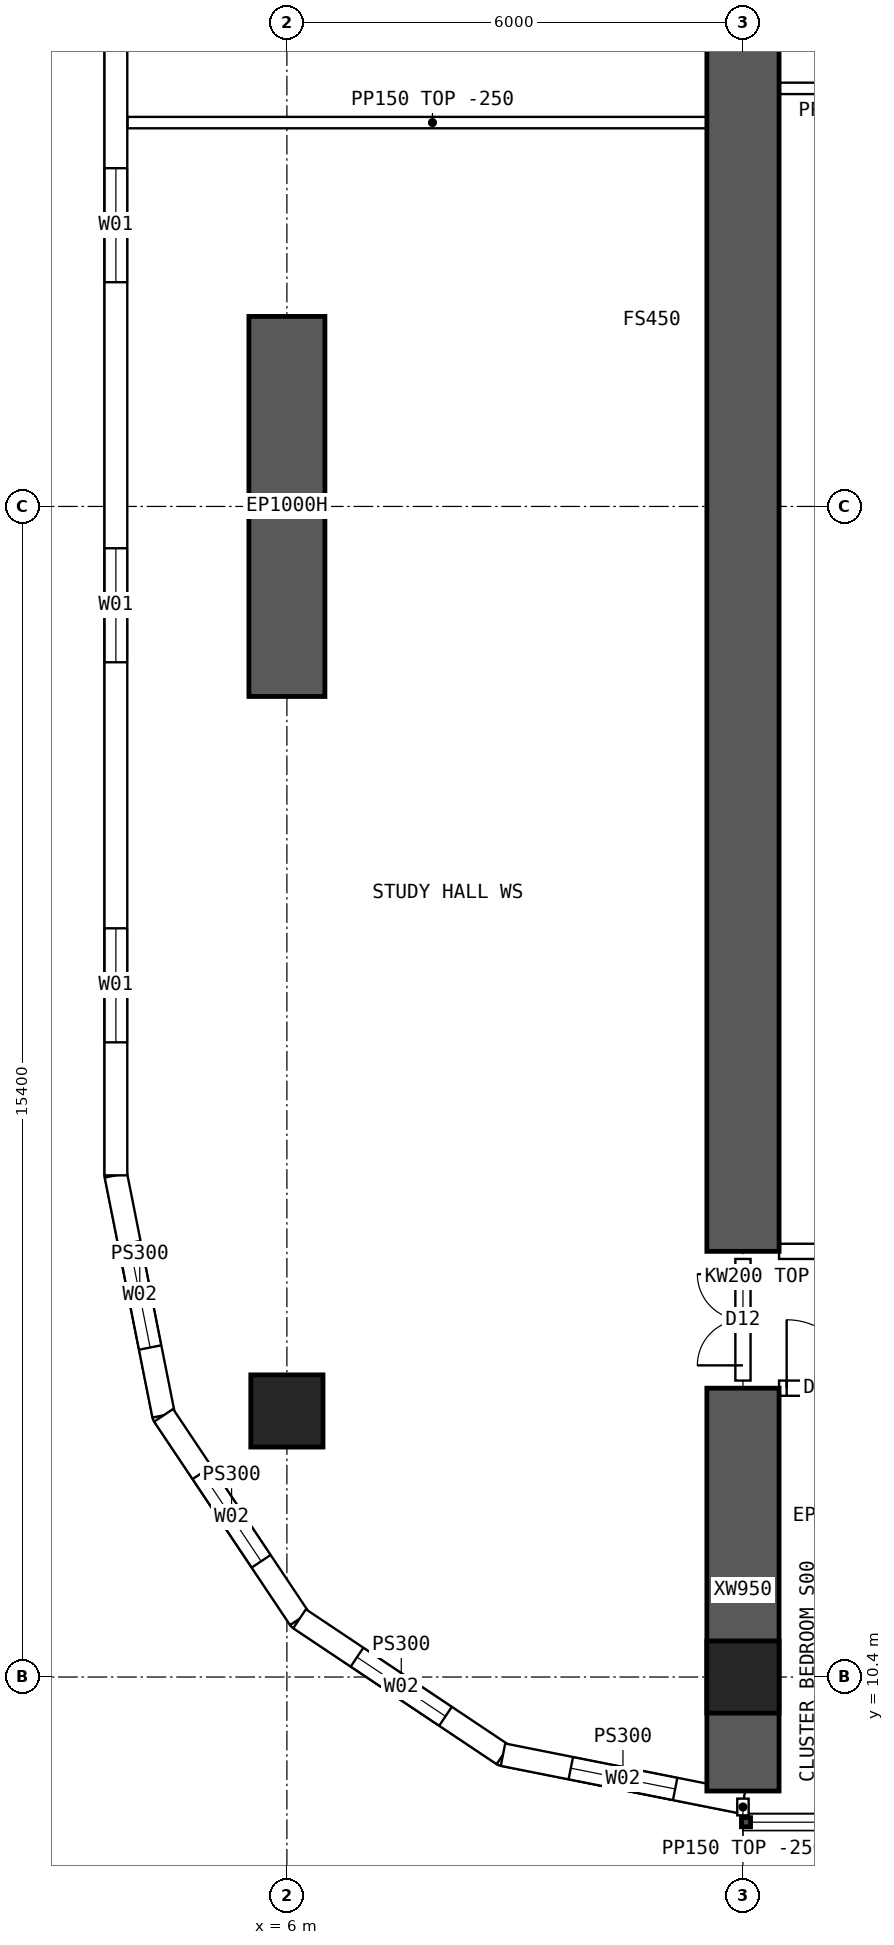
"""IFC4 building model, lengths in metres.
Left out: names, types, materials, properties, quantities, classifications, styles, units other than length and angle.
Written with IfcOpenShell. Run it as: python <this file> out.ifc"""

import sys

from ifc_helpers import new_model, si_unit, direction, frame, frame_2d, origin, origin_2d, place, context, subcontext, project, spatial, polyline, rectangle, hollow_rectangle, outline, extrude, element, fill, save


model = new_model("IFC4")
c1 = context("Model", 3, precision=1e-05, world=origin(), true_north=direction((0.0, 1.0)))
c2 = subcontext(c1, "Body", "Model", "MODEL_VIEW")
j1 = project(units=[si_unit("LENGTHUNIT", "METRE"), si_unit("PLANEANGLEUNIT", "RADIAN")], contexts=[c1])
p1 = place(None, origin())
s1 = spatial("IfcSite", under=j1, at=p1, CompositionType="ELEMENT")
p2 = place(p1, origin())
s2 = spatial("IfcBuilding", under=s1, at=p2, CompositionType="ELEMENT")
p3 = place(p2, frame((0.0, 0.0, 114.4)))
s3 = spatial("IfcBuildingStorey", under=s2, at=p3, CompositionType="ELEMENT", Elevation=114.4)
for number, where, z_axis, x_axis in (
    (1, (12.0, 10.4, 0.0), (0.0, 0.0, 1.0), (1.0, 0.0, 0.0)),
    (2, (6.0, 13.9, 0.0), (0.0, 0.0, 1.0), (1.0, 0.0, 0.0)),
):
    element("IfcColumn", number, at=place(p3, frame(where, z_axis=z_axis, x_axis=x_axis)), inside=s3, PredefinedType="COLUMN", context=c2, shape_type="SweptSolid", body=[
        extrude(hollow_rectangle(XDim=0.95, YDim=0.95, WallThickness=0.095, at=origin_2d()), origin(), (0.0, 0.0, 1.0), 3.75),
    ])
p4 = place(p3, frame((6.0, 23.3, 0.0), z_axis=(0.0, 0.0, 1.0), x_axis=(0.0, 1.0, 0.0)))
e3 = element("IfcWall", 3, at=p4, inside=s3, PredefinedType="SHEAR", context=c2, shape_type="SweptSolid", body=[
    extrude(rectangle(XDim=5.0, YDim=1.0, at=frame_2d((2.5, 0.0))), origin(), (0.0, 0.0, 1.0), 3.75),
])
p5 = place(p3, frame((12.0, 8.9, 0.0), z_axis=(0.0, 0.0, 1.0), x_axis=(0.0, 1.0, 0.0)))
e4 = element("IfcWall", 4, at=p5, inside=s3, PredefinedType="SHEAR", context=c2, shape_type="SweptSolid", body=[
    extrude(rectangle(XDim=5.3, YDim=0.95, at=frame_2d((2.65, 0.0))), origin(), (0.0, 0.0, 1.0), 3.75),
])
p6 = place(p3, frame((12.0, 16.0, 0.0), z_axis=(0.0, 0.0, 1.0), x_axis=(0.0, 1.0, 0.0)))
e5 = element("IfcWall", 5, at=p6, inside=s3, PredefinedType="SHEAR", context=c2, shape_type="SweptSolid", body=[
    extrude(rectangle(XDim=32.0, YDim=0.95, at=frame_2d((16.0, 0.0))), origin(), (0.0, 0.0, 1.0), 3.75),
])
p7 = place(p3, frame((3.75, 47.0, 0.0), z_axis=(0.0, 0.0, 1.0), x_axis=(0.0, -1.0, 0.0)))
e6 = element("IfcWall", 6, at=p7, inside=s3, PredefinedType="SOLIDWALL", context=c2, shape_type="SweptSolid", body=[
    extrude(outline(polyline([(-0.015, -0.15), (30.015, -0.15), (29.985, 0.15), (0.015, 0.15), (-0.015, -0.15)])), origin(), (0.0, 0.0, 1.0), 3.5),
])
p8 = place(p7, frame((1.75, 0.0, 0.9)))
e7 = element("IfcOpeningElement", 7, at=p8, cuts=e6, PredefinedType="OPENING", context=c2, shape_type="SweptSolid", body=[
    extrude(rectangle(XDim=1.5, YDim=2.0, at=frame_2d((0.75, 1.0))), frame((0.0, 0.16, 0.0), z_axis=(0.0, -1.0, 0.0), x_axis=(1.0, 0.0, 0.0)), (0.0, 0.0, 1.0), 0.32),
])
p9 = place(p7, frame((6.75, 0.0, 0.9)))
e8 = element("IfcOpeningElement", 8, at=p9, cuts=e6, PredefinedType="OPENING", context=c2, shape_type="SweptSolid", body=[
    extrude(rectangle(XDim=1.5, YDim=2.0, at=frame_2d((0.75, 1.0))), frame((0.0, 0.16, 0.0), z_axis=(0.0, -1.0, 0.0), x_axis=(1.0, 0.0, 0.0)), (0.0, 0.0, 1.0), 0.32),
])
p10 = place(p7, frame((11.75, 0.0, 0.9)))
e9 = element("IfcOpeningElement", 9, at=p10, cuts=e6, PredefinedType="OPENING", context=c2, shape_type="SweptSolid", body=[
    extrude(rectangle(XDim=1.5, YDim=2.0, at=frame_2d((0.75, 1.0))), frame((0.0, 0.16, 0.0), z_axis=(0.0, -1.0, 0.0), x_axis=(1.0, 0.0, 0.0)), (0.0, 0.0, 1.0), 0.32),
])
p11 = place(p7, frame((16.75, 0.0, 0.9)))
e10 = element("IfcOpeningElement", 10, at=p11, cuts=e6, PredefinedType="OPENING", context=c2, shape_type="SweptSolid", body=[
    extrude(rectangle(XDim=1.5, YDim=2.0, at=frame_2d((0.75, 1.0))), frame((0.0, 0.16, 0.0), z_axis=(0.0, -1.0, 0.0), x_axis=(1.0, 0.0, 0.0)), (0.0, 0.0, 1.0), 0.32),
])
p12 = place(p7, frame((21.75, 0.0, 0.9)))
e11 = element("IfcOpeningElement", 11, at=p12, cuts=e6, PredefinedType="OPENING", context=c2, shape_type="SweptSolid", body=[
    extrude(rectangle(XDim=1.5, YDim=2.0, at=frame_2d((0.75, 1.0))), frame((0.0, 0.16, 0.0), z_axis=(0.0, -1.0, 0.0), x_axis=(1.0, 0.0, 0.0)), (0.0, 0.0, 1.0), 0.32),
])
p13 = place(p7, frame((26.75, 0.0, 0.9)))
e12 = element("IfcOpeningElement", 12, at=p13, cuts=e6, PredefinedType="OPENING", context=c2, shape_type="SweptSolid", body=[
    extrude(rectangle(XDim=1.5, YDim=2.0, at=frame_2d((0.75, 1.0))), frame((0.0, 0.16, 0.0), z_axis=(0.0, -1.0, 0.0), x_axis=(1.0, 0.0, 0.0)), (0.0, 0.0, 1.0), 0.32),
])
p14 = place(p3, frame((3.75, 17.0, 0.0), z_axis=(0.0, 0.0, 1.0), x_axis=(0.195080412259, -0.980787251524, 0.0)))
e13 = element("IfcWall", 13, at=p14, inside=s3, PredefinedType="SOLIDWALL", context=c2, shape_type="SweptSolid", body=[
    extrude(outline(polyline([(-0.015, -0.15), (3.249, -0.15), (3.189, 0.15), (0.015, 0.15), (-0.015, -0.15)])), origin(), (0.0, 0.0, 1.0), 3.5),
])
p15 = place(p14, frame((0.909, 0.0, 0.9)))
e14 = element("IfcOpeningElement", 14, at=p15, cuts=e13, PredefinedType="OPENING", context=c2, shape_type="SweptSolid", body=[
    extrude(rectangle(XDim=1.4, YDim=1.8, at=frame_2d((0.7, 0.9))), frame((0.0, 0.16, 0.0), z_axis=(0.0, -1.0, 0.0), x_axis=(1.0, 0.0, 0.0)), (0.0, 0.0, 1.0), 0.32),
])
p16 = place(p3, frame((4.378, 13.843, 0.0), z_axis=(0.0, 0.0, 1.0), x_axis=(0.555609954424, -0.831443069936, 0.0)))
e15 = element("IfcWall", 15, at=p16, inside=s3, PredefinedType="SOLIDWALL", context=c2, shape_type="SweptSolid", body=[
    extrude(outline(polyline([(-0.03, -0.15), (3.249, -0.15), (3.189, 0.15), (0.03, 0.15), (-0.03, -0.15)])), origin(), (0.0, 0.0, 1.0), 3.5),
])
p17 = place(p16, frame((0.909, 0.0, 0.9)))
e16 = element("IfcOpeningElement", 16, at=p17, cuts=e15, PredefinedType="OPENING", context=c2, shape_type="SweptSolid", body=[
    extrude(rectangle(XDim=1.4, YDim=1.8, at=frame_2d((0.7, 0.9))), frame((0.0, 0.16, 0.0), z_axis=(0.0, -1.0, 0.0), x_axis=(1.0, 0.0, 0.0)), (0.0, 0.0, 1.0), 0.32),
])
p18 = place(p3, frame((6.167, 11.167, 0.0), z_axis=(0.0, 0.0, 1.0), x_axis=(0.831443069936, -0.555609954424, 0.0)))
e17 = element("IfcWall", 17, at=p18, inside=s3, PredefinedType="SOLIDWALL", context=c2, shape_type="SweptSolid", body=[
    extrude(outline(polyline([(-0.03, -0.15), (3.249, -0.15), (3.189, 0.15), (0.03, 0.15), (-0.03, -0.15)])), origin(), (0.0, 0.0, 1.0), 3.5),
])
p19 = place(p18, frame((0.909, 0.0, 0.9)))
e18 = element("IfcOpeningElement", 18, at=p19, cuts=e17, PredefinedType="OPENING", context=c2, shape_type="SweptSolid", body=[
    extrude(rectangle(XDim=1.4, YDim=1.8, at=frame_2d((0.7, 0.9))), frame((0.0, 0.16, 0.0), z_axis=(0.0, -1.0, 0.0), x_axis=(1.0, 0.0, 0.0)), (0.0, 0.0, 1.0), 0.32),
])
p20 = place(p3, frame((8.843, 9.378, 0.0), z_axis=(0.0, 0.0, 1.0), x_axis=(0.980787251524, -0.195080412259, 0.0)))
e19 = element("IfcWall", 19, at=p20, inside=s3, PredefinedType="SOLIDWALL", context=c2, shape_type="SweptSolid", body=[
    extrude(outline(polyline([(-0.03, -0.15), (3.249, -0.15), (3.189, 0.15), (0.03, 0.15), (-0.03, -0.15)])), origin(), (0.0, 0.0, 1.0), 3.5),
])
p21 = place(p20, frame((0.909, 0.0, 0.9)))
e20 = element("IfcOpeningElement", 20, at=p21, cuts=e19, PredefinedType="OPENING", context=c2, shape_type="SweptSolid", body=[
    extrude(rectangle(XDim=1.4, YDim=1.8, at=frame_2d((0.7, 0.9))), frame((0.0, 0.16, 0.0), z_axis=(0.0, -1.0, 0.0), x_axis=(1.0, 0.0, 0.0)), (0.0, 0.0, 1.0), 0.32),
])
p22 = place(p3, frame((12.475, 14.2, 0.0), z_axis=(0.0, 0.0, 1.0), x_axis=(1.0, 0.0, 0.0)))
e21 = element("IfcWall", 21, at=p22, inside=s3, PredefinedType="SOLIDWALL", context=c2, shape_type="SweptSolid", body=[
    extrude(outline(polyline([(0.0, 0.0), (5.05, 0.0), (5.05, 3.1), (0.0, 3.1), (0.0, 0.0)])), frame((0.0, 0.1, 0.0), z_axis=(0.0, -1.0, 0.0), x_axis=(1.0, 0.0, 0.0)), (0.0, 0.0, 1.0), 0.2),
])
p23 = place(p22, frame((0.1, 0.0, 0.0)))
e22 = element("IfcOpeningElement", 22, at=p23, cuts=e21, PredefinedType="OPENING", context=c2, shape_type="SweptSolid", body=[
    extrude(rectangle(XDim=0.9, YDim=2.1, at=frame_2d((0.45, 1.05))), frame((0.0, 0.11, 0.0), z_axis=(0.0, -1.0, 0.0), x_axis=(1.0, 0.0, 0.0)), (0.0, 0.0, 1.0), 0.22),
])
p24 = place(p22, frame((3.9, 0.0, 0.0)))
e23 = element("IfcOpeningElement", 23, at=p24, cuts=e21, PredefinedType="OPENING", context=c2, shape_type="SweptSolid", body=[
    extrude(rectangle(XDim=0.9, YDim=2.1, at=frame_2d((0.45, 1.05))), frame((0.0, 0.11, 0.0), z_axis=(0.0, -1.0, 0.0), x_axis=(1.0, 0.0, 0.0)), (0.0, 0.0, 1.0), 0.22),
])
p25 = place(p3, frame((12.475, 16.0, 0.0), z_axis=(0.0, 0.0, 1.0), x_axis=(1.0, 0.0, 0.0)))
e24 = element("IfcWall", 24, at=p25, inside=s3, PredefinedType="SOLIDWALL", context=c2, shape_type="SweptSolid", body=[
    extrude(rectangle(XDim=5.05, YDim=0.2, at=frame_2d((2.525, 0.0))), origin(), (0.0, 0.0, 1.0), 3.5),
])
p26 = place(p25, frame((3.325, 0.0, 0.0)))
e25 = element("IfcOpeningElement", 25, at=p26, cuts=e24, PredefinedType="OPENING", context=c2, shape_type="SweptSolid", body=[
    extrude(rectangle(XDim=1.6, YDim=2.1, at=frame_2d((0.8, 1.05))), frame((0.0, 0.11, 0.0), z_axis=(0.0, -1.0, 0.0), x_axis=(1.0, 0.0, 0.0)), (0.0, 0.0, 1.0), 0.22),
])
p27 = place(p3, frame((12.0, 31.3, 0.0), z_axis=(0.0, 0.0, 1.0), x_axis=(1.0, 0.0, 0.0)))
e26 = element("IfcWall", 26, at=p27, inside=s3, PredefinedType="PARTITIONING", context=c2, shape_type="SweptSolid", body=[
    extrude(rectangle(XDim=3.6, YDim=0.15, at=frame_2d((1.8, 0.0))), origin(), (0.0, 0.0, 1.0), 3.5),
])
p28 = place(p3, frame((3.905, 30.85, 0.0), z_axis=(0.0, 0.0, 1.0), x_axis=(1.0, 0.0, 0.0)))
e27 = element("IfcWall", 27, at=p28, inside=s3, PredefinedType="PARTITIONING", context=c2, shape_type="SweptSolid", body=[
    extrude(outline(polyline([(0.0, 0.0), (8.02, 0.0), (8.02, 3.5), (2.397, 3.5), (2.395, 3.05), (1.797, 3.05), (1.795, 3.5), (0.0, 3.5), (0.0, 0.0)])), frame((0.0, 0.075, 0.0), z_axis=(0.0, -1.0, 0.0), x_axis=(1.0, 0.0, 0.0)), (0.0, 0.0, 1.0), 0.15),
])
p29 = place(p3, frame((12.0, 14.3, 0.0), z_axis=(0.0, 0.0, 1.0), x_axis=(0.0, 1.0, 0.0)))
e28 = element("IfcWall", 28, at=p29, inside=s3, PredefinedType="SOLIDWALL", context=c2, shape_type="SweptSolid", body=[
    extrude(outline(polyline([(0.0, 0.0), (1.6, 0.0), (1.6, 3.1), (0.0, 3.1), (0.0, 0.0)])), frame((0.0, 0.1, 0.0), z_axis=(0.0, -1.0, 0.0), x_axis=(1.0, 0.0, 0.0)), (0.0, 0.0, 1.0), 0.2),
])
p30 = place(p29, frame((0.2, 0.0, 0.0)))
e29 = element("IfcOpeningElement", 29, at=p30, cuts=e28, PredefinedType="OPENING", context=c2, shape_type="SweptSolid", body=[
    extrude(rectangle(XDim=1.2, YDim=2.1, at=frame_2d((0.6, 1.05))), frame((0.0, 0.11, 0.0), z_axis=(0.0, -1.0, 0.0), x_axis=(1.0, 0.0, 0.0)), (0.0, 0.0, 1.0), 0.22),
])
p31 = place(p3, frame((12.0, 8.8, 0.0), z_axis=(0.0, 0.0, 1.0), x_axis=(0.0, -1.0, 0.0)))
e30 = element("IfcWall", 30, at=p31, inside=s3, PredefinedType="PARTITIONING", context=c2, shape_type="SweptSolid", body=[
    extrude(rectangle(XDim=0.22, YDim=0.15, at=frame_2d((0.11, 0.0))), origin(), (0.0, 0.0, 1.0), 3.5),
])
p32 = place(p11, origin())
e31 = element("IfcWindow", 31, at=p32, inside=s3, PartitioningType="SINGLE_PANEL", PredefinedType="WINDOW", context=c2, shape_type="SweptSolid", body=[
    extrude(rectangle(XDim=1.5, YDim=2.0, at=frame_2d((0.75, 1.0))), frame((0.0, 0.03, 0.0), z_axis=(0.0, -1.0, 0.0), x_axis=(1.0, 0.0, 0.0)), (0.0, 0.0, 1.0), 0.06),
])
fill(e10, e31)
p33 = place(p12, origin())
e32 = element("IfcWindow", 32, at=p33, inside=s3, PartitioningType="SINGLE_PANEL", PredefinedType="WINDOW", context=c2, shape_type="SweptSolid", body=[
    extrude(rectangle(XDim=1.5, YDim=2.0, at=frame_2d((0.75, 1.0))), frame((0.0, 0.03, 0.0), z_axis=(0.0, -1.0, 0.0), x_axis=(1.0, 0.0, 0.0)), (0.0, 0.0, 1.0), 0.06),
])
fill(e11, e32)
p34 = place(p13, origin())
e33 = element("IfcWindow", 33, at=p34, inside=s3, PartitioningType="SINGLE_PANEL", PredefinedType="WINDOW", context=c2, shape_type="SweptSolid", body=[
    extrude(rectangle(XDim=1.5, YDim=2.0, at=frame_2d((0.75, 1.0))), frame((0.0, 0.03, 0.0), z_axis=(0.0, -1.0, 0.0), x_axis=(1.0, 0.0, 0.0)), (0.0, 0.0, 1.0), 0.06),
])
fill(e12, e33)
p35 = place(p15, origin())
e34 = element("IfcWindow", 34, at=p35, inside=s3, PartitioningType="SINGLE_PANEL", PredefinedType="WINDOW", context=c2, shape_type="SweptSolid", body=[
    extrude(rectangle(XDim=1.4, YDim=1.8, at=frame_2d((0.7, 0.9))), frame((0.0, 0.03, 0.0), z_axis=(0.0, -1.0, 0.0), x_axis=(1.0, 0.0, 0.0)), (0.0, 0.0, 1.0), 0.06),
])
fill(e14, e34)
p36 = place(p17, origin())
e35 = element("IfcWindow", 35, at=p36, inside=s3, PartitioningType="SINGLE_PANEL", PredefinedType="WINDOW", context=c2, shape_type="SweptSolid", body=[
    extrude(rectangle(XDim=1.4, YDim=1.8, at=frame_2d((0.7, 0.9))), frame((0.0, 0.03, 0.0), z_axis=(0.0, -1.0, 0.0), x_axis=(1.0, 0.0, 0.0)), (0.0, 0.0, 1.0), 0.06),
])
fill(e16, e35)
p37 = place(p19, origin())
e36 = element("IfcWindow", 36, at=p37, inside=s3, PartitioningType="SINGLE_PANEL", PredefinedType="WINDOW", context=c2, shape_type="SweptSolid", body=[
    extrude(rectangle(XDim=1.4, YDim=1.8, at=frame_2d((0.7, 0.9))), frame((0.0, 0.03, 0.0), z_axis=(0.0, -1.0, 0.0), x_axis=(1.0, 0.0, 0.0)), (0.0, 0.0, 1.0), 0.06),
])
fill(e18, e36)
p38 = place(p21, origin())
e37 = element("IfcWindow", 37, at=p38, inside=s3, PartitioningType="SINGLE_PANEL", PredefinedType="WINDOW", context=c2, shape_type="SweptSolid", body=[
    extrude(rectangle(XDim=1.4, YDim=1.8, at=frame_2d((0.7, 0.9))), frame((0.0, 0.03, 0.0), z_axis=(0.0, -1.0, 0.0), x_axis=(1.0, 0.0, 0.0)), (0.0, 0.0, 1.0), 0.06),
])
fill(e20, e37)
p39 = place(p23, origin())
e38 = element("IfcDoor", 38, at=p39, inside=s3, OperationType="SINGLE_SWING_LEFT", PredefinedType="DOOR", context=c2, shape_type="SweptSolid", body=[
    extrude(rectangle(XDim=0.9, YDim=2.1, at=frame_2d((0.45, 1.05))), frame((0.0, 0.025, 0.0), z_axis=(0.0, -1.0, 0.0), x_axis=(1.0, 0.0, 0.0)), (0.0, 0.0, 1.0), 0.05),
])
fill(e22, e38)
p40 = place(p30, origin())
e39 = element("IfcDoor", 39, at=p40, inside=s3, OperationType="DOUBLE_DOOR_SINGLE_SWING", PredefinedType="DOOR", context=c2, shape_type="SweptSolid", body=[
    extrude(rectangle(XDim=1.2, YDim=2.1, at=frame_2d((0.6, 1.05))), frame((0.0, 0.025, 0.0), z_axis=(0.0, -1.0, 0.0), x_axis=(1.0, 0.0, 0.0)), (0.0, 0.0, 1.0), 0.05),
])
fill(e29, e39)
save(model, sys.argv[1])
